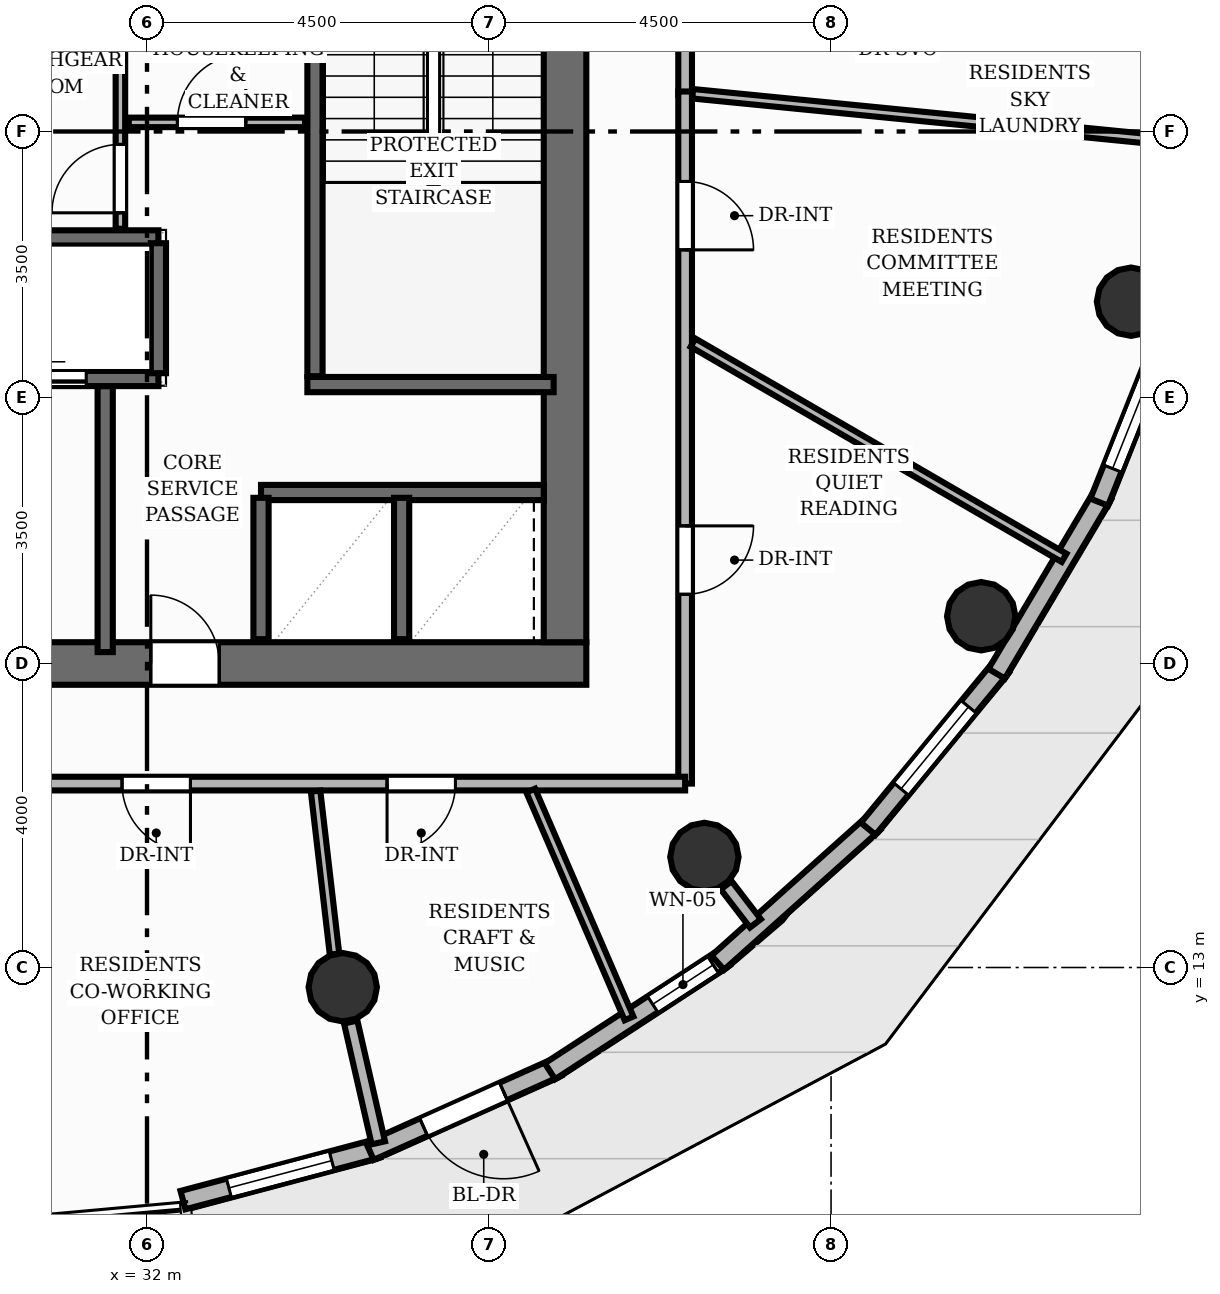
"""IFC4 building model, lengths in metres.
Left out: names, types, materials, properties, quantities, classifications, styles, units other than length and angle.
Written with IfcOpenShell. Run it as: python <this file> out.ifc"""

import sys

from ifc_helpers import new_model, si_unit, direction, frame, frame_2d, origin, origin_2d, place, context, subcontext, project, spatial, rectangle, circle, extrude, element, fill, save


model = new_model("IFC4")
c1 = context("Model", 3, precision=1e-05, world=origin(), true_north=direction((0.0, 1.0)))
c2 = subcontext(c1, "Body", "Model", "MODEL_VIEW")
j1 = project(units=[si_unit("LENGTHUNIT", "METRE"), si_unit("PLANEANGLEUNIT", "RADIAN")], contexts=[c1])
p1 = place(None, origin())
s1 = spatial("IfcSite", under=j1, at=p1, CompositionType="ELEMENT")
p2 = place(p1, origin())
s2 = spatial("IfcBuilding", under=s1, at=p2, CompositionType="ELEMENT")
p3 = place(p2, frame((0.0, 0.0, 185.44)))
s3 = spatial("IfcBuildingStorey", under=s2, at=p3, CompositionType="ELEMENT", Elevation=185.44)
p4 = place(p3, frame((26.22, 17.0, 0.0), z_axis=(0.0, 0.0, 1.0), x_axis=(1.0, 0.0, 0.0)))
e1 = element("IfcWall", 1, at=p4, inside=s3, PredefinedType="SHEAR", context=c2, shape_type="SweptSolid", body=[
    extrude(rectangle(XDim=11.56, YDim=0.56, at=frame_2d((5.78, 0.0))), origin(), (0.0, 0.0, 1.0), 3.2),
])
p5 = place(p4, frame((2.28, 0.0, 0.0)))
e2 = element("IfcOpeningElement", 2, at=p5, cuts=e1, PredefinedType="OPENING", context=c2, shape_type="SweptSolid", body=[
    extrude(rectangle(XDim=1.1, YDim=2.15, at=frame_2d((0.55, 1.075))), frame((0.0, 0.29, 0.0), z_axis=(0.0, -1.0, 0.0), x_axis=(1.0, 0.0, 0.0)), (0.0, 0.0, 1.0), 0.58),
])
p6 = place(p4, frame((5.83, 0.0, 0.0)))
e3 = element("IfcOpeningElement", 3, at=p6, cuts=e1, PredefinedType="OPENING", context=c2, shape_type="SweptSolid", body=[
    extrude(rectangle(XDim=0.9, YDim=2.1, at=frame_2d((0.45, 1.05))), frame((0.0, 0.29, 0.0), z_axis=(0.0, -1.0, 0.0), x_axis=(1.0, 0.0, 0.0)), (0.0, 0.0, 1.0), 0.58),
])
p7 = place(p3, frame((37.5, 17.28, 0.0), z_axis=(0.0, 0.0, 1.0), x_axis=(0.0, 1.0, 0.0)))
e4 = element("IfcWall", 4, at=p7, inside=s3, PredefinedType="SHEAR", context=c2, shape_type="SweptSolid", body=[
    extrude(rectangle(XDim=13.44, YDim=0.56, at=frame_2d((6.72, 0.0))), origin(), (0.0, 0.0, 1.0), 3.2),
])
for number, where, z_axis, x_axis in (
    (5, (34.575, 12.74, 0.0), (0.0, 0.0, 1.0), (1.0, 0.0, 0.0)),
    (6, (39.333, 14.455, 0.0), (0.0, 0.0, 1.0), (1.0, 0.0, 0.0)),
    (7, (42.975, 17.622, 0.0), (0.0, 0.0, 1.0), (1.0, 0.0, 0.0)),
    (8, (44.946, 21.76, 0.0), (0.0, 0.0, 1.0), (1.0, 0.0, 0.0)),
):
    element("IfcColumn", number, at=place(p3, frame(where, z_axis=z_axis, x_axis=x_axis)), inside=s3, PredefinedType="COLUMN", context=c2, shape_type="SweptSolid", body=[
        extrude(circle(Radius=0.45, at=origin_2d()), origin(), (0.0, 0.0, 1.0), 3.2),
    ])
p8 = place(p3, frame((35.035, 10.619, 0.0), z_axis=(0.0, 0.0, 1.0), x_axis=(-0.96652474621, -0.256573410476, 0.0)))
e9 = element("IfcWall", 9, at=p8, inside=s3, PredefinedType="SOLIDWALL", context=c2, shape_type="SweptSolid", body=[
    extrude(rectangle(XDim=2.651, YDim=0.25, at=frame_2d((1.325, 0.0))), origin(), (0.0, 0.0, 1.0), 2.96),
])
p9 = place(p8, frame((0.626, 0.0, 0.85)))
e10 = element("IfcOpeningElement", 10, at=p9, cuts=e9, PredefinedType="OPENING", context=c2, shape_type="SweptSolid", body=[
    extrude(rectangle(XDim=1.4, YDim=1.55, at=frame_2d((0.7, 0.775))), frame((0.0, 0.135, 0.0), z_axis=(0.0, -1.0, 0.0), x_axis=(1.0, 0.0, 0.0)), (0.0, 0.0, 1.0), 0.27),
])
p10 = place(p3, frame((37.397, 11.687, 0.0), z_axis=(0.0, 0.0, 1.0), x_axis=(-0.912615139532, -0.408819773368, 0.0)))
e11 = element("IfcWall", 11, at=p10, inside=s3, PredefinedType="SOLIDWALL", context=c2, shape_type="SweptSolid", body=[
    extrude(rectangle(XDim=2.702, YDim=0.25, at=frame_2d((1.351, 0.0))), origin(), (0.0, 0.0, 1.0), 2.96),
])
p11 = place(p10, frame((0.776, 0.0, 0.0)))
e12 = element("IfcOpeningElement", 12, at=p11, cuts=e11, PredefinedType="OPENING", context=c2, shape_type="SweptSolid", body=[
    extrude(rectangle(XDim=1.15, YDim=2.2, at=frame_2d((0.575, 1.1))), frame((0.0, 0.135, 0.0), z_axis=(0.0, -1.0, 0.0), x_axis=(1.0, 0.0, 0.0)), (0.0, 0.0, 1.0), 0.27),
])
p12 = place(p3, frame((39.596, 13.13, 0.0), z_axis=(0.0, 0.0, 1.0), x_axis=(-0.837860586987, -0.545884270496, 0.0)))
e13 = element("IfcWall", 13, at=p12, inside=s3, PredefinedType="SOLIDWALL", context=c2, shape_type="SweptSolid", body=[
    extrude(rectangle(XDim=2.739, YDim=0.25, at=frame_2d((1.369, 0.0))), origin(), (0.0, 0.0, 1.0), 2.96),
])
p13 = place(p12, frame((0.175, 0.0, 0.85)))
e14 = element("IfcOpeningElement", 14, at=p13, cuts=e13, PredefinedType="OPENING", context=c2, shape_type="SweptSolid", body=[
    extrude(rectangle(XDim=0.95, YDim=1.45, at=frame_2d((0.475, 0.725))), frame((0.0, 0.135, 0.0), z_axis=(0.0, -1.0, 0.0), x_axis=(1.0, 0.0, 0.0)), (0.0, 0.0, 1.0), 0.27),
])
p14 = place(p3, frame((41.564, 14.904, 0.0), z_axis=(0.0, 0.0, 1.0), x_axis=(-0.744898573364, -0.667177723998, 0.0)))
e15 = element("IfcWall", 15, at=p14, inside=s3, PredefinedType="SOLIDWALL", context=c2, shape_type="SweptSolid", body=[
    extrude(rectangle(XDim=2.758, YDim=0.25, at=frame_2d((1.379, 0.0))), origin(), (0.0, 0.0, 1.0), 2.96),
])
p15 = place(p3, frame((43.241, 16.955, 0.0), z_axis=(0.0, 0.0, 1.0), x_axis=(-0.635409334306, -0.772175483861, 0.0)))
e16 = element("IfcWall", 16, at=p15, inside=s3, PredefinedType="SOLIDWALL", context=c2, shape_type="SweptSolid", body=[
    extrude(rectangle(XDim=2.758, YDim=0.25, at=frame_2d((1.379, 0.0))), origin(), (0.0, 0.0, 1.0), 2.96),
])
p16 = place(p15, frame((0.679, 0.0, 0.85)))
e17 = element("IfcOpeningElement", 17, at=p16, cuts=e16, PredefinedType="OPENING", context=c2, shape_type="SweptSolid", body=[
    extrude(rectangle(XDim=1.4, YDim=1.55, at=frame_2d((0.7, 0.775))), frame((0.0, 0.135, 0.0), z_axis=(0.0, -1.0, 0.0), x_axis=(1.0, 0.0, 0.0)), (0.0, 0.0, 1.0), 0.27),
])
p17 = place(p3, frame((44.576, 19.221, 0.0), z_axis=(0.0, 0.0, 1.0), x_axis=(-0.510320389621, -0.859984360287, 0.0)))
e18 = element("IfcWall", 18, at=p17, inside=s3, PredefinedType="SOLIDWALL", context=c2, shape_type="SweptSolid", body=[
    extrude(rectangle(XDim=2.738, YDim=0.25, at=frame_2d((1.369, 0.0))), origin(), (0.0, 0.0, 1.0), 2.96),
])
p18 = place(p3, frame((45.528, 21.633, 0.0), z_axis=(0.0, 0.0, 1.0), x_axis=(-0.370330939431, -0.928899884433, 0.0)))
e19 = element("IfcWall", 19, at=p18, inside=s3, PredefinedType="SOLIDWALL", context=c2, shape_type="SweptSolid", body=[
    extrude(rectangle(XDim=2.702, YDim=0.25, at=frame_2d((1.351, 0.0))), origin(), (0.0, 0.0, 1.0), 2.96),
])
p19 = place(p18, frame((0.576, 0.0, 0.85)))
e20 = element("IfcOpeningElement", 20, at=p19, cuts=e19, PredefinedType="OPENING", context=c2, shape_type="SweptSolid", body=[
    extrude(rectangle(XDim=1.65, YDim=1.55, at=frame_2d((0.825, 0.775))), frame((0.0, 0.135, 0.0), z_axis=(0.0, -1.0, 0.0), x_axis=(1.0, 0.0, 0.0)), (0.0, 0.0, 1.0), 0.27),
])
p20 = place(p3, frame((34.21, 20.78, 0.0), z_axis=(0.0, 0.0, 1.0), x_axis=(0.0, 1.0, 0.0)))
e21 = element("IfcWall", 21, at=p20, inside=s3, PredefinedType="SHEAR", context=c2, shape_type="SweptSolid", body=[
    extrude(rectangle(XDim=6.44, YDim=0.2, at=frame_2d((3.22, 0.0))), origin(), (0.0, 0.0, 1.0), 3.2),
])
p21 = place(p3, frame((34.11, 20.67, 0.0), z_axis=(0.0, 0.0, 1.0), x_axis=(1.0, 0.0, 0.0)))
e22 = element("IfcWall", 22, at=p21, inside=s3, PredefinedType="SHEAR", context=c2, shape_type="SweptSolid", body=[
    extrude(rectangle(XDim=3.24, YDim=0.2, at=frame_2d((1.62, 0.0))), origin(), (0.0, 0.0, 1.0), 3.2),
])
p22 = place(p3, frame((31.45, 17.15, 0.0), z_axis=(0.0, 0.0, 1.0), x_axis=(0.0, 1.0, 0.0)))
e23 = element("IfcWall", 23, at=p22, inside=s3, PredefinedType="SHEAR", context=c2, shape_type="SweptSolid", body=[
    extrude(rectangle(XDim=3.5, YDim=0.2, at=frame_2d((1.75, 0.0))), origin(), (0.0, 0.0, 1.0), 3.2),
])
p23 = place(p3, frame((29.85, 20.75, 0.0), z_axis=(0.0, 0.0, 1.0), x_axis=(1.0, 0.0, 0.0)))
e24 = element("IfcWall", 24, at=p23, inside=s3, PredefinedType="SHEAR", context=c2, shape_type="SweptSolid", body=[
    extrude(rectangle(XDim=2.3, YDim=0.2, at=frame_2d((1.15, 0.0))), origin(), (0.0, 0.0, 1.0), 3.2),
])
p24 = place(p23, frame((0.25, 0.0, 0.0)))
e25 = element("IfcOpeningElement", 25, at=p24, cuts=e24, PredefinedType="OPENING", context=c2, shape_type="SweptSolid", body=[
    extrude(rectangle(XDim=1.1, YDim=2.15, at=frame_2d((0.55, 1.075))), frame((0.0, 0.11, 0.0), z_axis=(0.0, -1.0, 0.0), x_axis=(1.0, 0.0, 0.0)), (0.0, 0.0, 1.0), 0.22),
])
p25 = place(p3, frame((29.85, 22.6, 0.0), z_axis=(0.0, 0.0, 1.0), x_axis=(1.0, 0.0, 0.0)))
e26 = element("IfcWall", 26, at=p25, inside=s3, PredefinedType="SHEAR", context=c2, shape_type="SweptSolid", body=[
    extrude(rectangle(XDim=2.3, YDim=0.2, at=frame_2d((1.15, 0.0))), origin(), (0.0, 0.0, 1.0), 3.2),
])
p26 = place(p3, frame((32.15, 20.82, 0.0), z_axis=(0.0, 0.0, 1.0), x_axis=(0.0, 1.0, 0.0)))
e27 = element("IfcWall", 27, at=p26, inside=s3, PredefinedType="SHEAR", context=c2, shape_type="SweptSolid", body=[
    extrude(rectangle(XDim=1.71, YDim=0.2, at=frame_2d((0.855, 0.0))), origin(), (0.0, 0.0, 1.0), 3.2),
])
p27 = place(p3, frame((33.5, 19.25, 0.0), z_axis=(0.0, 0.0, 1.0), x_axis=(1.0, 0.0, 0.0)))
e28 = element("IfcWall", 28, at=p27, inside=s3, PredefinedType="SHEAR", context=c2, shape_type="SweptSolid", body=[
    extrude(rectangle(XDim=3.72, YDim=0.2, at=frame_2d((1.86, 0.0))), origin(), (0.0, 0.0, 1.0), 3.2),
])
for number, where, z_axis, x_axis in (
    (29, (33.5, 17.32, 0.0), (0.0, 0.0, 1.0), (0.0, 1.0, 0.0)),
    (30, (35.35, 17.32, 0.0), (0.0, 0.0, 1.0), (0.0, 1.0, 0.0)),
):
    element("IfcWall", number, at=place(p3, frame(where, z_axis=z_axis, x_axis=x_axis)), inside=s3, PredefinedType="SHEAR", context=c2, shape_type="SweptSolid", body=[
        extrude(rectangle(XDim=1.86, YDim=0.2, at=frame_2d((0.93, 0.0))), origin(), (0.0, 0.0, 1.0), 3.2),
    ])
p28 = place(p3, frame((31.65, 22.72, 0.0), z_axis=(0.0, 0.0, 1.0), x_axis=(0.0, 1.0, 0.0)))
e31 = element("IfcWall", 31, at=p28, inside=s3, PredefinedType="PARTITIONING", context=c2, shape_type="SweptSolid", body=[
    extrude(rectangle(XDim=2.52, YDim=0.125, at=frame_2d((1.26, 0.0))), origin(), (0.0, 0.0, 1.0), 2.955),
])
p29 = place(p28, frame((0.21, 0.0, 0.0)))
e32 = element("IfcOpeningElement", 32, at=p29, cuts=e31, PredefinedType="OPENING", context=c2, shape_type="SweptSolid", body=[
    extrude(rectangle(XDim=0.9, YDim=2.1, at=frame_2d((0.45, 1.05))), frame((0.0, 0.073, 0.0), z_axis=(0.0, -1.0, 0.0), x_axis=(1.0, 0.0, 0.0)), (0.0, 0.0, 1.0), 0.145),
])
p30 = place(p3, frame((31.76, 24.12, 0.0), z_axis=(0.0, 0.0, 1.0), x_axis=(1.0, 0.0, 0.0)))
e33 = element("IfcWall", 33, at=p30, inside=s3, PredefinedType="PARTITIONING", context=c2, shape_type="SweptSolid", body=[
    extrude(rectangle(XDim=2.32, YDim=0.125, at=frame_2d((1.16, 0.0))), origin(), (0.0, 0.0, 1.0), 2.955),
])
p31 = place(p30, frame((0.64, 0.0, 0.0)))
e34 = element("IfcOpeningElement", 34, at=p31, cuts=e33, PredefinedType="OPENING", context=c2, shape_type="SweptSolid", body=[
    extrude(rectangle(XDim=0.9, YDim=2.1, at=frame_2d((0.45, 1.05))), frame((0.0, 0.073, 0.0), z_axis=(0.0, -1.0, 0.0), x_axis=(1.0, 0.0, 0.0)), (0.0, 0.0, 1.0), 0.145),
])
p32 = place(p3, frame((34.68, 12.282, 0.0), z_axis=(0.0, 0.0, 1.0), x_axis=(0.222967107114, -0.974825968645, 0.0)))
e35 = element("IfcWall", 35, at=p32, inside=s3, PredefinedType="PARTITIONING", context=c2, shape_type="SweptSolid", body=[
    extrude(rectangle(XDim=1.63, YDim=0.18, at=frame_2d((0.815, 0.0))), origin(), (0.0, 0.0, 1.0), 2.404),
])
p33 = place(p3, frame((39.62, 14.082, 0.0), z_axis=(0.0, 0.0, 1.0), x_axis=(0.609112888366, -0.793083532314, 0.0)))
e36 = element("IfcWall", 36, at=p33, inside=s3, PredefinedType="PARTITIONING", context=c2, shape_type="SweptSolid", body=[
    extrude(rectangle(XDim=0.632, YDim=0.18, at=frame_2d((0.316, 0.0))), origin(), (0.0, 0.0, 1.0), 2.404),
])
p34 = place(p3, frame((39.08, 32.58, 0.0), z_axis=(0.0, 0.0, 1.0), x_axis=(0.0, -1.0, 0.0)))
e37 = element("IfcWall", 37, at=p34, inside=s3, PredefinedType="PARTITIONING", context=c2, shape_type="SweptSolid", body=[
    extrude(rectangle(XDim=8.094, YDim=0.18, at=frame_2d((4.047, 0.0))), origin(), (0.0, 0.0, 1.0), 2.955),
])
p35 = place(p34, frame((5.174, 0.0, 0.0)))
e38 = element("IfcOpeningElement", 38, at=p35, cuts=e37, PredefinedType="OPENING", context=c2, shape_type="SweptSolid", body=[
    extrude(rectangle(XDim=0.9, YDim=2.1, at=frame_2d((0.45, 1.05))), frame((0.0, 0.1, 0.0), z_axis=(0.0, -1.0, 0.0), x_axis=(1.0, 0.0, 0.0)), (0.0, 0.0, 1.0), 0.2),
])
p36 = place(p3, frame((39.08, 24.526, 0.0), z_axis=(0.0, 0.0, 1.0), x_axis=(0.0, -1.0, 0.0)))
e39 = element("IfcWall", 39, at=p36, inside=s3, PredefinedType="PARTITIONING", context=c2, shape_type="SweptSolid", body=[
    extrude(rectangle(XDim=9.106, YDim=0.18, at=frame_2d((4.553, 0.0))), origin(), (0.0, 0.0, 1.0), 2.955),
])
p37 = place(p36, frame((1.184, 0.0, 0.0)))
e40 = element("IfcOpeningElement", 40, at=p37, cuts=e39, PredefinedType="OPENING", context=c2, shape_type="SweptSolid", body=[
    extrude(rectangle(XDim=0.9, YDim=2.1, at=frame_2d((0.45, 1.05))), frame((0.0, 0.1, 0.0), z_axis=(0.0, -1.0, 0.0), x_axis=(1.0, 0.0, 0.0)), (0.0, 0.0, 1.0), 0.2),
])
p38 = place(p36, frame((5.716, 0.0, 0.0)))
e41 = element("IfcOpeningElement", 41, at=p38, cuts=e39, PredefinedType="OPENING", context=c2, shape_type="SweptSolid", body=[
    extrude(rectangle(XDim=0.9, YDim=2.1, at=frame_2d((0.45, 1.05))), frame((0.0, 0.1, 0.0), z_axis=(0.0, -1.0, 0.0), x_axis=(1.0, 0.0, 0.0)), (0.0, 0.0, 1.0), 0.2),
])
p39 = place(p3, frame((39.08, 15.42, 0.0), z_axis=(0.0, 0.0, 1.0), x_axis=(-1.0, 0.0, 0.0)))
e42 = element("IfcWall", 42, at=p39, inside=s3, PredefinedType="PARTITIONING", context=c2, shape_type="SweptSolid", body=[
    extrude(rectangle(XDim=10.594, YDim=0.18, at=frame_2d((5.297, 0.0))), origin(), (0.0, 0.0, 1.0), 2.955),
])
p40 = place(p39, frame((3.021, 0.0, 0.0)))
e43 = element("IfcOpeningElement", 43, at=p40, cuts=e42, PredefinedType="OPENING", context=c2, shape_type="SweptSolid", body=[
    extrude(rectangle(XDim=0.9, YDim=2.1, at=frame_2d((0.45, 1.05))), frame((0.0, 0.1, 0.0), z_axis=(0.0, -1.0, 0.0), x_axis=(1.0, 0.0, 0.0)), (0.0, 0.0, 1.0), 0.2),
])
p41 = place(p39, frame((6.508, 0.0, 0.0)))
e44 = element("IfcOpeningElement", 44, at=p41, cuts=e42, PredefinedType="OPENING", context=c2, shape_type="SweptSolid", body=[
    extrude(rectangle(XDim=0.9, YDim=2.1, at=frame_2d((0.45, 1.05))), frame((0.0, 0.1, 0.0), z_axis=(0.0, -1.0, 0.0), x_axis=(1.0, 0.0, 0.0)), (0.0, 0.0, 1.0), 0.2),
])
p42 = place(p3, frame((44.066, 18.39, 0.0), z_axis=(0.0, 0.0, 1.0), x_axis=(-0.865092390625, 0.501612555348, 0.0)))
e45 = element("IfcWall", 45, at=p42, inside=s3, PredefinedType="PARTITIONING", context=c2, shape_type="SweptSolid", body=[
    extrude(rectangle(XDim=5.643, YDim=0.125, at=frame_2d((2.822, 0.0))), origin(), (0.0, 0.0, 1.0), 2.692),
])
p43 = place(p3, frame((39.179, 24.497, 0.0), z_axis=(0.0, 0.0, 1.0), x_axis=(0.995152744832, -0.098341316102, 0.0)))
e46 = element("IfcWall", 46, at=p43, inside=s3, PredefinedType="PARTITIONING", context=c2, shape_type="SweptSolid", body=[
    extrude(rectangle(XDim=6.842, YDim=0.125, at=frame_2d((3.421, 0.0))), origin(), (0.0, 0.0, 1.0), 2.692),
])
p44 = place(p3, frame((38.342, 12.331, 0.0), z_axis=(0.0, 0.0, 1.0), x_axis=(-0.396192482216, 0.918167477662, 0.0)))
e47 = element("IfcWall", 47, at=p44, inside=s3, PredefinedType="PARTITIONING", context=c2, shape_type="SweptSolid", body=[
    extrude(rectangle(XDim=3.265, YDim=0.125, at=frame_2d((1.632, 0.0))), origin(), (0.0, 0.0, 1.0), 2.692),
])
p45 = place(p3, frame((34.467, 13.176, 0.0), z_axis=(0.0, 0.0, 1.0), x_axis=(-0.115430815868, 0.993315522253, 0.0)))
e48 = element("IfcWall", 48, at=p45, inside=s3, PredefinedType="PARTITIONING", context=c2, shape_type="SweptSolid", body=[
    extrude(rectangle(XDim=2.159, YDim=0.125, at=frame_2d((1.08, 0.0))), origin(), (0.0, 0.0, 1.0), 2.404),
])
p46 = place(p11, origin())
e49 = element("IfcDoor", 49, at=p46, inside=s3, OperationType="SINGLE_SWING_LEFT", PredefinedType="DOOR", context=c2, shape_type="SweptSolid", body=[
    extrude(rectangle(XDim=1.15, YDim=2.2, at=frame_2d((0.575, 1.1))), frame((0.0, 0.025, 0.0), z_axis=(0.0, -1.0, 0.0), x_axis=(1.0, 0.0, 0.0)), (0.0, 0.0, 1.0), 0.05),
])
fill(e12, e49)
p47 = place(p9, origin())
e50 = element("IfcWindow", 50, at=p47, inside=s3, PartitioningType="SINGLE_PANEL", PredefinedType="WINDOW", context=c2, shape_type="SweptSolid", body=[
    extrude(rectangle(XDim=1.4, YDim=1.55, at=frame_2d((0.7, 0.775))), frame((0.0, 0.03, 0.0), z_axis=(0.0, -1.0, 0.0), x_axis=(1.0, 0.0, 0.0)), (0.0, 0.0, 1.0), 0.06),
])
fill(e10, e50)
p48 = place(p13, origin())
e51 = element("IfcWindow", 51, at=p48, inside=s3, PartitioningType="SINGLE_PANEL", PredefinedType="WINDOW", context=c2, shape_type="SweptSolid", body=[
    extrude(rectangle(XDim=0.95, YDim=1.45, at=frame_2d((0.475, 0.725))), frame((0.0, 0.03, 0.0), z_axis=(0.0, -1.0, 0.0), x_axis=(1.0, 0.0, 0.0)), (0.0, 0.0, 1.0), 0.06),
])
fill(e14, e51)
p49 = place(p16, origin())
e52 = element("IfcWindow", 52, at=p49, inside=s3, PartitioningType="SINGLE_PANEL", PredefinedType="WINDOW", context=c2, shape_type="SweptSolid", body=[
    extrude(rectangle(XDim=1.4, YDim=1.55, at=frame_2d((0.7, 0.775))), frame((0.0, 0.03, 0.0), z_axis=(0.0, -1.0, 0.0), x_axis=(1.0, 0.0, 0.0)), (0.0, 0.0, 1.0), 0.06),
])
fill(e17, e52)
p50 = place(p19, origin())
e53 = element("IfcWindow", 53, at=p50, inside=s3, PartitioningType="SINGLE_PANEL", PredefinedType="WINDOW", context=c2, shape_type="SweptSolid", body=[
    extrude(rectangle(XDim=1.65, YDim=1.55, at=frame_2d((0.825, 0.775))), frame((0.0, 0.03, 0.0), z_axis=(0.0, -1.0, 0.0), x_axis=(1.0, 0.0, 0.0)), (0.0, 0.0, 1.0), 0.06),
])
fill(e20, e53)
p51 = place(p24, origin())
e54 = element("IfcDoor", 54, at=p51, inside=s3, OperationType="DOUBLE_DOOR_SLIDING", PredefinedType="DOOR", context=c2, shape_type="SweptSolid", body=[
    extrude(rectangle(XDim=1.1, YDim=2.15, at=frame_2d((0.55, 1.075))), frame((0.0, 0.025, 0.0), z_axis=(0.0, -1.0, 0.0), x_axis=(1.0, 0.0, 0.0)), (0.0, 0.0, 1.0), 0.05),
])
fill(e25, e54)
p52 = place(p6, origin())
e55 = element("IfcDoor", 55, at=p52, inside=s3, OperationType="SINGLE_SWING_LEFT", PredefinedType="DOOR", context=c2, shape_type="SweptSolid", body=[
    extrude(rectangle(XDim=0.9, YDim=2.1, at=frame_2d((0.45, 1.05))), frame((0.0, 0.025, 0.0), z_axis=(0.0, -1.0, 0.0), x_axis=(1.0, 0.0, 0.0)), (0.0, 0.0, 1.0), 0.05),
])
fill(e3, e55)
p53 = place(p29, origin())
e56 = element("IfcDoor", 56, at=p53, inside=s3, OperationType="SINGLE_SWING_LEFT", PredefinedType="DOOR", context=c2, shape_type="SweptSolid", body=[
    extrude(rectangle(XDim=0.9, YDim=2.1, at=frame_2d((0.45, 1.05))), frame((0.0, 0.025, 0.0), z_axis=(0.0, -1.0, 0.0), x_axis=(1.0, 0.0, 0.0)), (0.0, 0.0, 1.0), 0.05),
])
fill(e32, e56)
p54 = place(p31, origin())
e57 = element("IfcDoor", 57, at=p54, inside=s3, OperationType="SINGLE_SWING_RIGHT", PredefinedType="DOOR", context=c2, shape_type="SweptSolid", body=[
    extrude(rectangle(XDim=0.9, YDim=2.1, at=frame_2d((0.45, 1.05))), frame((0.0, 0.025, 0.0), z_axis=(0.0, -1.0, 0.0), x_axis=(1.0, 0.0, 0.0)), (0.0, 0.0, 1.0), 0.05),
])
fill(e34, e57)
p55 = place(p37, origin())
e58 = element("IfcDoor", 58, at=p55, inside=s3, OperationType="SINGLE_SWING_RIGHT", PredefinedType="DOOR", context=c2, shape_type="SweptSolid", body=[
    extrude(rectangle(XDim=0.9, YDim=2.1, at=frame_2d((0.45, 1.05))), frame((0.0, 0.025, 0.0), z_axis=(0.0, -1.0, 0.0), x_axis=(1.0, 0.0, 0.0)), (0.0, 0.0, 1.0), 0.05),
])
fill(e40, e58)
p56 = place(p38, origin())
e59 = element("IfcDoor", 59, at=p56, inside=s3, OperationType="SINGLE_SWING_LEFT", PredefinedType="DOOR", context=c2, shape_type="SweptSolid", body=[
    extrude(rectangle(XDim=0.9, YDim=2.1, at=frame_2d((0.45, 1.05))), frame((0.0, 0.025, 0.0), z_axis=(0.0, -1.0, 0.0), x_axis=(1.0, 0.0, 0.0)), (0.0, 0.0, 1.0), 0.05),
])
fill(e41, e59)
p57 = place(p40, origin())
e60 = element("IfcDoor", 60, at=p57, inside=s3, OperationType="SINGLE_SWING_RIGHT", PredefinedType="DOOR", context=c2, shape_type="SweptSolid", body=[
    extrude(rectangle(XDim=0.9, YDim=2.1, at=frame_2d((0.45, 1.05))), frame((0.0, 0.025, 0.0), z_axis=(0.0, -1.0, 0.0), x_axis=(1.0, 0.0, 0.0)), (0.0, 0.0, 1.0), 0.05),
])
fill(e43, e60)
p58 = place(p41, origin())
e61 = element("IfcDoor", 61, at=p58, inside=s3, OperationType="SINGLE_SWING_LEFT", PredefinedType="DOOR", context=c2, shape_type="SweptSolid", body=[
    extrude(rectangle(XDim=0.9, YDim=2.1, at=frame_2d((0.45, 1.05))), frame((0.0, 0.025, 0.0), z_axis=(0.0, -1.0, 0.0), x_axis=(1.0, 0.0, 0.0)), (0.0, 0.0, 1.0), 0.05),
])
fill(e44, e61)
save(model, sys.argv[1])
